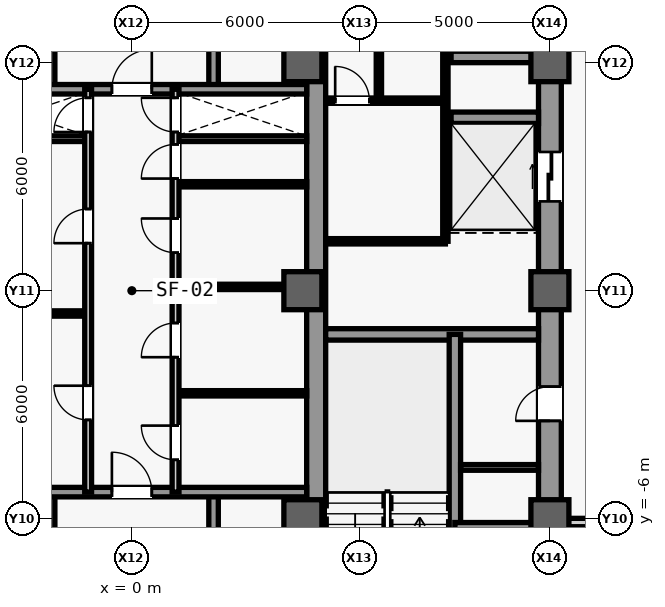
"""IFC4 building model, lengths in metres.
Left out: names, types, materials, properties, quantities, classifications, styles, units other than length and angle.
Written with IfcOpenShell. Run it as: python <this file> out.ifc"""

import sys

from ifc_helpers import new_model, si_unit, direction, frame, frame_2d, origin, origin_2d, place, context, subcontext, project, spatial, rectangle, extrude, source, transform, mapped, element, fill, save


model = new_model("IFC4")
c1 = context("Model", 3, precision=1e-05, world=origin(), true_north=direction((0.0, 1.0)))
c2 = subcontext(c1, "Body", "Model", "MODEL_VIEW")
j1 = project(units=[si_unit("LENGTHUNIT", "METRE"), si_unit("PLANEANGLEUNIT", "RADIAN")], contexts=[c1])
p1 = place(None, origin())
s1 = spatial("IfcSite", under=j1, at=p1, CompositionType="ELEMENT")
p2 = place(p1, origin())
s2 = spatial("IfcBuilding", under=s1, at=p2, CompositionType="ELEMENT")
p3 = place(p2, frame((0.0, 0.0, -4.8)))
s3 = spatial("IfcBuildingStorey", under=s2, at=p3, CompositionType="ELEMENT", Elevation=-4.8)
m1 = source(origin(), c2, "Body", "SweptSolid", [
    extrude(rectangle(XDim=22.0, YDim=0.6, at=frame_2d((11.0, 0.0))), origin(), (0.0, 0.0, 1.0), 4.48),
])
p4 = place(p3, frame((11.0, -11.0, 0.0), z_axis=(0.0, 0.0, 1.0), x_axis=(0.0, 1.0, 0.0)))
e1 = element("IfcWall", 1, at=p4, inside=s3, PredefinedType="SHEAR", context=c2, shape_type="MappedRepresentation", body=[
    mapped(m1, transform((0.0, 0.0, 0.0), scale=1.0)),
])
m2 = source(origin(), c2, "Body", "SweptSolid", [
    extrude(rectangle(XDim=1.1, YDim=2.2, at=frame_2d((0.55, 1.1))), frame((0.0, 0.31, 0.0), z_axis=(0.0, -1.0, 0.0), x_axis=(1.0, 0.0, 0.0)), (0.0, 0.0, 1.0), 0.62),
])
p5 = place(p4, frame((0.8, 0.0, 0.0)))
e2 = element("IfcOpeningElement", 2, at=p5, cuts=e1, PredefinedType="OPENING", context=c2, shape_type="MappedRepresentation", body=[
    mapped(m2, transform((0.0, 0.0, 0.0), scale=1.0)),
])
m3 = source(origin(), c2, "Body", "SweptSolid", [
    extrude(rectangle(XDim=0.9, YDim=2.15, at=frame_2d((0.45, 1.075))), frame((0.0, 0.31, 0.0), z_axis=(0.0, -1.0, 0.0), x_axis=(1.0, 0.0, 0.0)), (0.0, 0.0, 1.0), 0.62),
])
p6 = place(p4, frame((7.575, 0.0, 0.0)))
e3 = element("IfcOpeningElement", 3, at=p6, cuts=e1, PredefinedType="OPENING", context=c2, shape_type="MappedRepresentation", body=[
    mapped(m3, transform((0.0, 0.0, 0.0), scale=1.0)),
])
m4 = source(origin(), c2, "Body", "SweptSolid", [
    extrude(rectangle(XDim=1.3, YDim=2.3, at=frame_2d((0.65, 1.15))), frame((0.0, 0.31, 0.0), z_axis=(0.0, -1.0, 0.0), x_axis=(1.0, 0.0, 0.0)), (0.0, 0.0, 1.0), 0.62),
])
p7 = place(p4, frame((2.7, 0.0, 0.0)))
e4 = element("IfcOpeningElement", 4, at=p7, cuts=e1, PredefinedType="OPENING", context=c2, shape_type="MappedRepresentation", body=[
    mapped(m4, transform((0.0, 0.0, 0.0), scale=1.0)),
])
p8 = place(p4, frame((13.35, 0.0, 0.0)))
e5 = element("IfcOpeningElement", 5, at=p8, cuts=e1, PredefinedType="OPENING", context=c2, shape_type="MappedRepresentation", body=[
    mapped(m4, transform((0.0, 0.0, 0.0), scale=1.0)),
])
m5 = source(origin(), c2, "Body", "SweptSolid", [
    extrude(rectangle(XDim=21.4, YDim=0.5, at=frame_2d((10.7, 0.0))), origin(), (0.0, 0.0, 1.0), 4.48),
])
p9 = place(p3, frame((4.85, -10.7, 0.0), z_axis=(0.0, 0.0, 1.0), x_axis=(0.0, 1.0, 0.0)))
e6 = element("IfcWall", 6, at=p9, inside=s3, PredefinedType="SHEAR", context=c2, shape_type="MappedRepresentation", body=[
    mapped(m5, transform((0.0, 0.0, 0.0), scale=1.0)),
])
m6 = source(origin(), c2, "Body", "SweptSolid", [
    extrude(rectangle(XDim=5.6, YDim=0.3, at=frame_2d((2.8, 0.0))), origin(), (0.0, 0.0, 1.0), 4.48),
])
p10 = place(p3, frame((5.1, -1.15, 0.0), z_axis=(0.0, 0.0, 1.0), x_axis=(1.0, 0.0, 0.0)))
e7 = element("IfcWall", 7, at=p10, inside=s3, PredefinedType="SHEAR", context=c2, shape_type="MappedRepresentation", body=[
    mapped(m6, transform((0.0, 0.0, 0.0), scale=1.0)),
])
m7 = source(origin(), c2, "Body", "SweptSolid", [
    extrude(rectangle(XDim=1.0, YDim=1.0, at=origin_2d()), origin(), (0.0, 0.0, 1.0), 4.8),
])
for number, where, z_axis, x_axis in (
    (8, (4.5, -6.0, 0.0), (0.0, 0.0, 1.0), (1.0, 0.0, 0.0)),
    (9, (4.5, 0.0, 0.0), (0.0, 0.0, 1.0), (1.0, 0.0, 0.0)),
    (10, (4.5, 6.0, 0.0), (0.0, 0.0, 1.0), (1.0, 0.0, 0.0)),
    (11, (11.0, -6.0, 0.0), (0.0, 0.0, 1.0), (1.0, 0.0, 0.0)),
    (12, (11.0, 0.0, 0.0), (0.0, 0.0, 1.0), (1.0, 0.0, 0.0)),
    (13, (11.0, 6.0, 0.0), (0.0, 0.0, 1.0), (1.0, 0.0, 0.0)),
):
    element("IfcColumn", number, at=place(p3, frame(where, z_axis=z_axis, x_axis=x_axis)), inside=s3, PredefinedType="COLUMN", context=c2, shape_type="MappedRepresentation", body=[
        mapped(m7, transform((0.0, 0.0, 0.0), scale=1.0)),
    ])
m8 = source(origin(), c2, "Body", "SweptSolid", [
    extrude(rectangle(XDim=7.8, YDim=0.3, at=frame_2d((3.9, 0.0))), origin(), (0.0, 0.0, 1.0), 4.48),
])
p11 = place(p3, frame((8.5, -8.95, 0.0), z_axis=(0.0, 0.0, 1.0), x_axis=(0.0, 1.0, 0.0)))
e14 = element("IfcWall", 14, at=p11, inside=s3, PredefinedType="SHEAR", context=c2, shape_type="MappedRepresentation", body=[
    mapped(m8, transform((0.0, 0.0, 0.0), scale=1.0)),
])
m9 = source(origin(), c2, "Body", "SweptSolid", [
    extrude(rectangle(XDim=2.2, YDim=0.3, at=frame_2d((1.1, 0.0))), origin(), (0.0, 0.0, 1.0), 4.48),
])
p12 = place(p3, frame((8.5, -6.25, 0.0), z_axis=(0.0, 0.0, 1.0), x_axis=(1.0, 0.0, 0.0)))
e15 = element("IfcWall", 15, at=p12, inside=s3, PredefinedType="SHEAR", context=c2, shape_type="MappedRepresentation", body=[
    mapped(m9, transform((0.0, 0.0, 0.0), scale=1.0)),
])
m10 = source(origin(), c2, "Body", "SweptSolid", [
    extrude(rectangle(XDim=2.3, YDim=0.3, at=frame_2d((1.15, 0.0))), origin(), (0.0, 0.0, 1.0), 4.48),
])
for number, where, z_axis, x_axis in (
    (16, (8.4, 4.55, 0.0), (0.0, 0.0, 1.0), (1.0, 0.0, 0.0)),
    (17, (8.4, 6.15, 0.0), (0.0, 0.0, 1.0), (1.0, 0.0, 0.0)),
):
    element("IfcWall", number, at=place(p3, frame(where, z_axis=z_axis, x_axis=x_axis)), inside=s3, PredefinedType="SHEAR", context=c2, shape_type="MappedRepresentation", body=[
        mapped(m10, transform((0.0, 0.0, 0.0), scale=1.0)),
    ])
m11 = source(origin(), c2, "Body", "SweptSolid", [
    extrude(rectangle(XDim=2.05, YDim=0.15, at=frame_2d((1.025, 0.0))), origin(), (0.0, 0.0, 1.0), 4.48),
])
p13 = place(p3, frame((8.65, -4.65, 0.0), z_axis=(0.0, 0.0, 1.0), x_axis=(1.0, 0.0, 0.0)))
e18 = element("IfcWall", 18, at=p13, inside=s3, PredefinedType="PARTITIONING", context=c2, shape_type="MappedRepresentation", body=[
    mapped(m11, transform((0.0, 0.0, 0.0), scale=1.0)),
])
m12 = source(origin(), c2, "Body", "SweptSolid", [
    extrude(rectangle(XDim=9.4, YDim=0.14, at=frame_2d((4.7, 0.0))), origin(), (0.0, 0.0, 1.0), 4.48),
])
p14 = place(p3, frame((8.25, 1.3, 0.0), z_axis=(0.0, 0.0, 1.0), x_axis=(0.0, 1.0, 0.0)))
e19 = element("IfcWall", 19, at=p14, inside=s3, PredefinedType="PARTITIONING", context=c2, shape_type="MappedRepresentation", body=[
    mapped(m12, transform((0.0, 0.0, 0.0), scale=1.0)),
])
m13 = source(origin(), c2, "Body", "SweptSolid", [
    extrude(rectangle(XDim=3.15, YDim=0.14, at=frame_2d((1.575, 0.0))), origin(), (0.0, 0.0, 1.0), 4.48),
])
p15 = place(p3, frame((5.1, 1.3, 0.0), z_axis=(0.0, 0.0, 1.0), x_axis=(1.0, 0.0, 0.0)))
e20 = element("IfcWall", 20, at=p15, inside=s3, PredefinedType="PARTITIONING", context=c2, shape_type="MappedRepresentation", body=[
    mapped(m13, transform((0.0, 0.0, 0.0), scale=1.0)),
])
m14 = source(origin(), c2, "Body", "SweptSolid", [
    extrude(rectangle(XDim=5.7, YDim=0.14, at=frame_2d((2.85, 0.0))), origin(), (0.0, 0.0, 1.0), 4.48),
])
p16 = place(p3, frame((6.5, 5.0, 0.0), z_axis=(0.0, 0.0, 1.0), x_axis=(0.0, 1.0, 0.0)))
e21 = element("IfcWall", 21, at=p16, inside=s3, PredefinedType="PARTITIONING", context=c2, shape_type="MappedRepresentation", body=[
    mapped(m14, transform((0.0, 0.0, 0.0), scale=1.0)),
])
m15 = source(origin(), c2, "Body", "SweptSolid", [
    extrude(rectangle(XDim=0.9, YDim=2.15, at=frame_2d((0.45, 1.075))), frame((0.0, 0.08, 0.0), z_axis=(0.0, -1.0, 0.0), x_axis=(1.0, 0.0, 0.0)), (0.0, 0.0, 1.0), 0.16),
])
p17 = place(p16, frame((2.05, 0.0, 0.0)))
e22 = element("IfcOpeningElement", 22, at=p17, cuts=e21, PredefinedType="OPENING", context=c2, shape_type="MappedRepresentation", body=[
    mapped(m15, transform((0.0, 0.0, 0.0), scale=1.0)),
])
p18 = place(p3, frame((5.1, 5.0, 0.0), z_axis=(0.0, 0.0, 1.0), x_axis=(1.0, 0.0, 0.0)))
e23 = element("IfcWall", 23, at=p18, inside=s3, PredefinedType="PARTITIONING", context=c2, shape_type="MappedRepresentation", body=[
    mapped(m13, transform((0.0, 0.0, 0.0), scale=1.0)),
])
p19 = place(p18, frame((0.25, 0.0, 0.0)))
e24 = element("IfcOpeningElement", 24, at=p19, cuts=e23, PredefinedType="OPENING", context=c2, shape_type="MappedRepresentation", body=[
    mapped(m15, transform((0.0, 0.0, 0.0), scale=1.0)),
])
m16 = source(origin(), c2, "Body", "SweptSolid", [
    extrude(rectangle(XDim=4.05, YDim=0.22, at=frame_2d((2.025, 0.0))), origin(), (0.0, 0.0, 1.0), 4.48),
])
p20 = place(p3, frame((11.3, -6.1, 0.0), z_axis=(0.0, 0.0, 1.0), x_axis=(1.0, 0.0, 0.0)))
e25 = element("IfcWall", 25, at=p20, inside=s3, PredefinedType="PARTITIONING", context=c2, shape_type="MappedRepresentation", body=[
    mapped(m16, transform((0.0, 0.0, 0.0), scale=1.0)),
])
m17 = source(origin(), c2, "Body", "SweptSolid", [
    extrude(rectangle(XDim=3.45, YDim=0.15, at=frame_2d((1.725, 0.0))), origin(), (0.0, 0.0, 1.0), 4.48),
])
for number, where, z_axis, x_axis in (
    (26, (-4.6, 4.0, 0.0), (0.0, 0.0, 1.0), (1.0, 0.0, 0.0)),
    (27, (1.15, 4.0, 0.0), (0.0, 0.0, 1.0), (1.0, 0.0, 0.0)),
):
    element("IfcWall", number, at=place(p3, frame(where, z_axis=z_axis, x_axis=x_axis)), inside=s3, PredefinedType="PARTITIONING", context=c2, shape_type="MappedRepresentation", body=[
        mapped(m17, transform((0.0, 0.0, 0.0), scale=1.0)),
    ])
m18 = source(origin(), c2, "Body", "SweptSolid", [
    extrude(rectangle(XDim=5.4, YDim=0.25, at=frame_2d((2.7, 0.0))), origin(), (0.0, 0.0, 1.0), 4.48),
])
for number, where, z_axis, x_axis in (
    (28, (-2.15, -10.7, 0.0), (0.0, 0.0, 1.0), (0.0, 1.0, 0.0)),
    (29, (2.15, -10.7, 0.0), (0.0, 0.0, 1.0), (0.0, 1.0, 0.0)),
):
    element("IfcWall", number, at=place(p3, frame(where, z_axis=z_axis, x_axis=x_axis)), inside=s3, PredefinedType="SHEAR", context=c2, shape_type="MappedRepresentation", body=[
        mapped(m18, transform((0.0, 0.0, 0.0), scale=1.0)),
    ])
m19 = source(origin(), c2, "Body", "SweptSolid", [
    extrude(rectangle(XDim=9.2, YDim=0.25, at=frame_2d((4.6, 0.0))), origin(), (0.0, 0.0, 1.0), 4.48),
])
p21 = place(p3, frame((-4.6, -5.3, 0.0), z_axis=(0.0, 0.0, 1.0), x_axis=(1.0, 0.0, 0.0)))
e30 = element("IfcWall", 30, at=p21, inside=s3, PredefinedType="SHEAR", context=c2, shape_type="MappedRepresentation", body=[
    mapped(m19, transform((0.0, 0.0, 0.0), scale=1.0)),
])
m20 = source(origin(), c2, "Body", "SweptSolid", [
    extrude(rectangle(XDim=1.05, YDim=2.2, at=frame_2d((0.525, 1.1))), frame((0.0, 0.135, 0.0), z_axis=(0.0, -1.0, 0.0), x_axis=(1.0, 0.0, 0.0)), (0.0, 0.0, 1.0), 0.27),
])
p22 = place(p21, frame((4.075, 0.0, 0.0)))
e31 = element("IfcOpeningElement", 31, at=p22, cuts=e30, PredefinedType="OPENING", context=c2, shape_type="MappedRepresentation", body=[
    mapped(m20, transform((0.0, 0.0, 0.0), scale=1.0)),
])
for number, where, z_axis, x_axis in (
    (32, (-2.15, 5.3, 0.0), (0.0, 0.0, 1.0), (0.0, 1.0, 0.0)),
    (33, (2.15, 5.3, 0.0), (0.0, 0.0, 1.0), (0.0, 1.0, 0.0)),
):
    element("IfcWall", number, at=place(p3, frame(where, z_axis=z_axis, x_axis=x_axis)), inside=s3, PredefinedType="SHEAR", context=c2, shape_type="MappedRepresentation", body=[
        mapped(m18, transform((0.0, 0.0, 0.0), scale=1.0)),
    ])
p23 = place(p3, frame((-4.6, 5.3, 0.0), z_axis=(0.0, 0.0, 1.0), x_axis=(1.0, 0.0, 0.0)))
e34 = element("IfcWall", 34, at=p23, inside=s3, PredefinedType="SHEAR", context=c2, shape_type="MappedRepresentation", body=[
    mapped(m19, transform((0.0, 0.0, 0.0), scale=1.0)),
])
p24 = place(p23, frame((4.075, 0.0, 0.0)))
e35 = element("IfcOpeningElement", 35, at=p24, cuts=e34, PredefinedType="OPENING", context=c2, shape_type="MappedRepresentation", body=[
    mapped(m20, transform((0.0, 0.0, 0.0), scale=1.0)),
])
m21 = source(origin(), c2, "Body", "SweptSolid", [
    extrude(rectangle(XDim=3.45, YDim=0.14, at=frame_2d((1.725, 0.0))), origin(), (0.0, 0.0, 1.0), 4.48),
])
p25 = place(p3, frame((-4.6, -0.6, 0.0), z_axis=(0.0, 0.0, 1.0), x_axis=(1.0, 0.0, 0.0)))
e36 = element("IfcWall", 36, at=p25, inside=s3, PredefinedType="PARTITIONING", context=c2, shape_type="MappedRepresentation", body=[
    mapped(m21, transform((0.0, 0.0, 0.0), scale=1.0)),
])
m22 = source(origin(), c2, "Body", "SweptSolid", [
    extrude(rectangle(XDim=10.6, YDim=0.18, at=frame_2d((5.3, 0.0))), origin(), (0.0, 0.0, 1.0), 4.48),
])
p26 = place(p3, frame((-1.15, -5.3, 0.0), z_axis=(0.0, 0.0, 1.0), x_axis=(0.0, 1.0, 0.0)))
e37 = element("IfcWall", 37, at=p26, inside=s3, PredefinedType="PARTITIONING", context=c2, shape_type="MappedRepresentation", body=[
    mapped(m22, transform((0.0, 0.0, 0.0), scale=1.0)),
])
m23 = source(origin(), c2, "Body", "SweptSolid", [
    extrude(rectangle(XDim=0.9, YDim=2.15, at=frame_2d((0.45, 1.075))), frame((0.0, 0.1, 0.0), z_axis=(0.0, -1.0, 0.0), x_axis=(1.0, 0.0, 0.0)), (0.0, 0.0, 1.0), 0.2),
])
p27 = place(p26, frame((1.9, 0.0, 0.0)))
e38 = element("IfcOpeningElement", 38, at=p27, cuts=e37, PredefinedType="OPENING", context=c2, shape_type="MappedRepresentation", body=[
    mapped(m23, transform((0.0, 0.0, 0.0), scale=1.0)),
])
p28 = place(p26, frame((6.55, 0.0, 0.0)))
e39 = element("IfcOpeningElement", 39, at=p28, cuts=e37, PredefinedType="OPENING", context=c2, shape_type="MappedRepresentation", body=[
    mapped(m23, transform((0.0, 0.0, 0.0), scale=1.0)),
])
p29 = place(p26, frame((9.475, 0.0, 0.0)))
e40 = element("IfcOpeningElement", 40, at=p29, cuts=e37, PredefinedType="OPENING", context=c2, shape_type="MappedRepresentation", body=[
    mapped(m23, transform((0.0, 0.0, 0.0), scale=1.0)),
])
p30 = place(p3, frame((1.15, -2.7, 0.0), z_axis=(0.0, 0.0, 1.0), x_axis=(1.0, 0.0, 0.0)))
e41 = element("IfcWall", 41, at=p30, inside=s3, PredefinedType="PARTITIONING", context=c2, shape_type="MappedRepresentation", body=[
    mapped(m21, transform((0.0, 0.0, 0.0), scale=1.0)),
])
m24 = source(origin(), c2, "Body", "SweptSolid", [
    extrude(rectangle(XDim=3.45, YDim=0.14, at=frame_2d((1.725, 0.0))), origin(), (0.0, 0.0, 1.0), 3.785),
])
p31 = place(p3, frame((1.15, 0.1, 0.0), z_axis=(0.0, 0.0, 1.0), x_axis=(1.0, 0.0, 0.0)))
e42 = element("IfcWall", 42, at=p31, inside=s3, PredefinedType="PARTITIONING", context=c2, shape_type="MappedRepresentation", body=[
    mapped(m24, transform((0.0, 0.0, 0.0), scale=1.0)),
])
p32 = place(p3, frame((1.15, 2.8, 0.0), z_axis=(0.0, 0.0, 1.0), x_axis=(1.0, 0.0, 0.0)))
e43 = element("IfcWall", 43, at=p32, inside=s3, PredefinedType="PARTITIONING", context=c2, shape_type="MappedRepresentation", body=[
    mapped(m21, transform((0.0, 0.0, 0.0), scale=1.0)),
])
p33 = place(p3, frame((1.15, -5.3, 0.0), z_axis=(0.0, 0.0, 1.0), x_axis=(0.0, 1.0, 0.0)))
e44 = element("IfcWall", 44, at=p33, inside=s3, PredefinedType="PARTITIONING", context=c2, shape_type="MappedRepresentation", body=[
    mapped(m22, transform((0.0, 0.0, 0.0), scale=1.0)),
])
p34 = place(p33, frame((0.85, 0.0, 0.0)))
e45 = element("IfcOpeningElement", 45, at=p34, cuts=e44, PredefinedType="OPENING", context=c2, shape_type="MappedRepresentation", body=[
    mapped(m23, transform((0.0, 0.0, 0.0), scale=1.0)),
])
p35 = place(p33, frame((3.55, 0.0, 0.0)))
e46 = element("IfcOpeningElement", 46, at=p35, cuts=e44, PredefinedType="OPENING", context=c2, shape_type="MappedRepresentation", body=[
    mapped(m23, transform((0.0, 0.0, 0.0), scale=1.0)),
])
p36 = place(p33, frame((6.3, 0.0, 0.0)))
e47 = element("IfcOpeningElement", 47, at=p36, cuts=e44, PredefinedType="OPENING", context=c2, shape_type="MappedRepresentation", body=[
    mapped(m23, transform((0.0, 0.0, 0.0), scale=1.0)),
])
p37 = place(p33, frame((8.25, 0.0, 0.0)))
e48 = element("IfcOpeningElement", 48, at=p37, cuts=e44, PredefinedType="OPENING", context=c2, shape_type="MappedRepresentation", body=[
    mapped(m23, transform((0.0, 0.0, 0.0), scale=1.0)),
])
p38 = place(p33, frame((9.475, 0.0, 0.0)))
e49 = element("IfcOpeningElement", 49, at=p38, cuts=e44, PredefinedType="OPENING", context=c2, shape_type="MappedRepresentation", body=[
    mapped(m23, transform((0.0, 0.0, 0.0), scale=1.0)),
])
m25 = source(origin(), c2, "Body", "SweptSolid", [
    extrude(rectangle(XDim=0.9, YDim=2.15, at=frame_2d((0.45, 1.075))), frame((0.0, 0.025, 0.0), z_axis=(0.0, -1.0, 0.0), x_axis=(1.0, 0.0, 0.0)), (0.0, 0.0, 1.0), 0.05),
])
p39 = place(p6, origin())
e50 = element("IfcDoor", 50, at=p39, inside=s3, OperationType="SINGLE_SWING_LEFT", PredefinedType="DOOR", context=c2, shape_type="MappedRepresentation", body=[
    mapped(m25, transform((0.0, 0.0, 0.0), scale=1.0)),
])
fill(e3, e50)
p40 = place(p19, origin())
e51 = element("IfcDoor", 51, at=p40, inside=s3, OperationType="SINGLE_SWING_LEFT", PredefinedType="DOOR", context=c2, shape_type="MappedRepresentation", body=[
    mapped(m25, transform((0.0, 0.0, 0.0), scale=1.0)),
])
fill(e24, e51)
m26 = source(origin(), c2, "Body", "SweptSolid", [
    extrude(rectangle(XDim=1.05, YDim=2.2, at=frame_2d((0.525, 1.1))), frame((0.0, 0.025, 0.0), z_axis=(0.0, -1.0, 0.0), x_axis=(1.0, 0.0, 0.0)), (0.0, 0.0, 1.0), 0.05),
])
p41 = place(p22, origin())
e52 = element("IfcDoor", 52, at=p41, inside=s3, OperationType="SINGLE_SWING_LEFT", PredefinedType="DOOR", context=c2, shape_type="MappedRepresentation", body=[
    mapped(m26, transform((0.0, 0.0, 0.0), scale=1.0)),
])
fill(e31, e52)
p42 = place(p24, origin())
e53 = element("IfcDoor", 53, at=p42, inside=s3, OperationType="SINGLE_SWING_RIGHT", PredefinedType="DOOR", context=c2, shape_type="MappedRepresentation", body=[
    mapped(m26, transform((0.0, 0.0, 0.0), scale=1.0)),
])
fill(e35, e53)
p43 = place(p27, origin())
e54 = element("IfcDoor", 54, at=p43, inside=s3, OperationType="SINGLE_SWING_RIGHT", PredefinedType="DOOR", context=c2, shape_type="MappedRepresentation", body=[
    mapped(m25, transform((0.0, 0.0, 0.0), scale=1.0)),
])
fill(e38, e54)
p44 = place(p28, origin())
e55 = element("IfcDoor", 55, at=p44, inside=s3, OperationType="SINGLE_SWING_LEFT", PredefinedType="DOOR", context=c2, shape_type="MappedRepresentation", body=[
    mapped(m25, transform((0.0, 0.0, 0.0), scale=1.0)),
])
fill(e39, e55)
p45 = place(p34, origin())
e56 = element("IfcDoor", 56, at=p45, inside=s3, OperationType="SINGLE_SWING_RIGHT", PredefinedType="DOOR", context=c2, shape_type="MappedRepresentation", body=[
    mapped(m25, transform((0.0, 0.0, 0.0), scale=1.0)),
])
fill(e45, e56)
p46 = place(p35, origin())
e57 = element("IfcDoor", 57, at=p46, inside=s3, OperationType="SINGLE_SWING_LEFT", PredefinedType="DOOR", context=c2, shape_type="MappedRepresentation", body=[
    mapped(m25, transform((0.0, 0.0, 0.0), scale=1.0)),
])
fill(e46, e57)
p47 = place(p36, origin())
e58 = element("IfcDoor", 58, at=p47, inside=s3, OperationType="SINGLE_SWING_RIGHT", PredefinedType="DOOR", context=c2, shape_type="MappedRepresentation", body=[
    mapped(m25, transform((0.0, 0.0, 0.0), scale=1.0)),
])
fill(e47, e58)
p48 = place(p37, origin())
e59 = element("IfcDoor", 59, at=p48, inside=s3, OperationType="SINGLE_SWING_LEFT", PredefinedType="DOOR", context=c2, shape_type="MappedRepresentation", body=[
    mapped(m25, transform((0.0, 0.0, 0.0), scale=1.0)),
])
fill(e48, e59)
p49 = place(p29, origin())
e60 = element("IfcDoor", 60, at=p49, inside=s3, OperationType="SINGLE_SWING_LEFT", PredefinedType="DOOR", context=c2, shape_type="MappedRepresentation", body=[
    mapped(m25, transform((0.0, 0.0, 0.0), scale=1.0)),
])
fill(e40, e60)
p50 = place(p38, origin())
e61 = element("IfcDoor", 61, at=p50, inside=s3, OperationType="SINGLE_SWING_RIGHT", PredefinedType="DOOR", context=c2, shape_type="MappedRepresentation", body=[
    mapped(m25, transform((0.0, 0.0, 0.0), scale=1.0)),
])
fill(e49, e61)
m27 = source(origin(), c2, "Body", "SweptSolid", [
    extrude(rectangle(XDim=1.3, YDim=2.3, at=frame_2d((0.65, 1.15))), frame((0.0, 0.025, 0.0), z_axis=(0.0, -1.0, 0.0), x_axis=(1.0, 0.0, 0.0)), (0.0, 0.0, 1.0), 0.05),
])
p51 = place(p8, origin())
e62 = element("IfcDoor", 62, at=p51, inside=s3, OperationType="SLIDING_TO_LEFT", PredefinedType="DOOR", context=c2, shape_type="MappedRepresentation", body=[
    mapped(m27, transform((0.0, 0.0, 0.0), scale=1.0)),
])
fill(e5, e62)
save(model, sys.argv[1])
